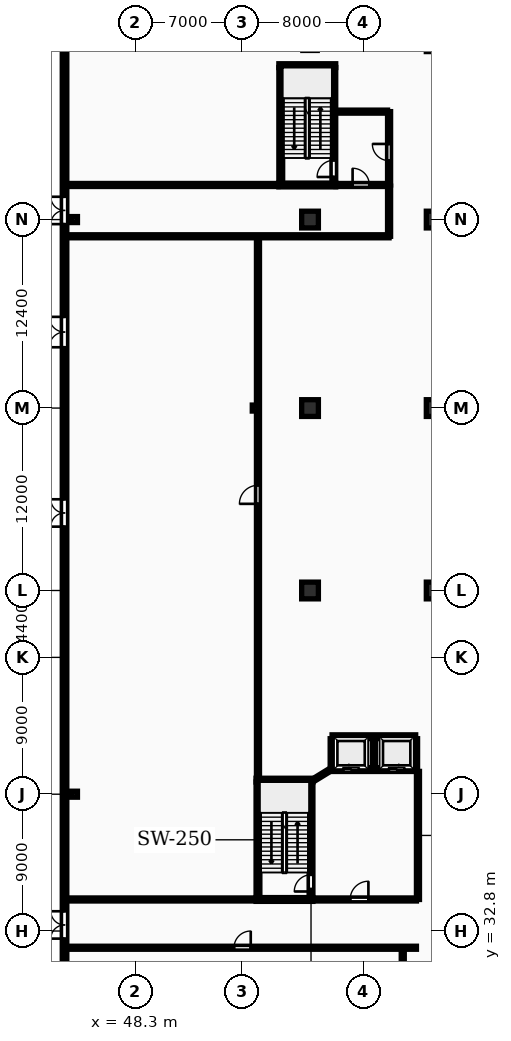
"""IFC4 building model, lengths in metres.
Left out: names, types, materials, properties, quantities, classifications, styles, units other than length and angle.
Written with IfcOpenShell. Run it as: python <this file> out.ifc"""

import sys

from ifc_helpers import new_model, si_unit, direction, frame, frame_2d, origin, origin_2d, place, context, subcontext, project, spatial, rectangle, i_section, extrude, element, fill, save


model = new_model("IFC4")
c1 = context("Model", 3, precision=1e-05, world=origin(), true_north=direction((0.0, 1.0)))
c2 = subcontext(c1, "Body", "Model", "MODEL_VIEW")
j1 = project(units=[si_unit("LENGTHUNIT", "METRE"), si_unit("PLANEANGLEUNIT", "RADIAN")], contexts=[c1])
p1 = place(None, origin())
s1 = spatial("IfcSite", under=j1, at=p1, CompositionType="ELEMENT")
p2 = place(p1, origin())
s2 = spatial("IfcBuilding", under=s1, at=p2, CompositionType="ELEMENT")
p3 = place(p2, origin())
s3 = spatial("IfcBuildingStorey", under=s2, at=p3, CompositionType="ELEMENT", Elevation=0.0)
for number, where, z_axis, x_axis in (
    (1, (59.8, 55.2, 0.0), (0.0, 0.0, 1.0), (1.0, 0.0, 0.0)),
    (2, (59.8, 67.2, 0.0), (0.0, 0.0, 1.0), (1.0, 0.0, 0.0)),
    (3, (59.8, 79.6, 0.0), (0.0, 0.0, 1.0), (1.0, 0.0, 0.0)),
    (4, (68.0, 55.2, 0.0), (0.0, 0.0, 1.0), (1.0, 0.0, 0.0)),
    (5, (68.0, 67.2, 0.0), (0.0, 0.0, 1.0), (1.0, 0.0, 0.0)),
    (6, (68.0, 79.6, 0.0), (0.0, 0.0, 1.0), (1.0, 0.0, 0.0)),
):
    element("IfcColumn", number, at=place(p3, frame(where, z_axis=z_axis, x_axis=x_axis)), inside=s3, PredefinedType="COLUMN", context=c2, shape_type="SweptSolid", body=[
        extrude(rectangle(XDim=1.1, YDim=1.1, at=origin_2d()), origin(), (0.0, 0.0, 1.0), 5.4),
    ])
for number, where, z_axis, x_axis in (
    (7, (56.2, 67.2, 0.0), (0.0, 0.0, 1.0), (1.0, 0.0, 0.0)),
    (8, (44.3, 41.8, 0.0), (0.0, 0.0, 1.0), (1.0, 0.0, 0.0)),
    (9, (44.3, 79.6, 0.0), (0.0, 0.0, 1.0), (1.0, 0.0, 0.0)),
):
    element("IfcColumn", number, at=place(p3, frame(where, z_axis=z_axis, x_axis=x_axis)), inside=s3, PredefinedType="COLUMN", context=c2, shape_type="SweptSolid", body=[
        extrude(i_section(OverallWidth=0.399, OverallDepth=0.394, WebThickness=0.023, FlangeThickness=0.037, FilletRadius=0.015, at=origin_2d()), origin(), (0.0, 0.0, 1.0), 5.4),
    ])
p4 = place(p3, frame((43.65, 109.2, 0.0), z_axis=(0.0, 0.0, 1.0), x_axis=(0.0, -1.0, 0.0)))
e10 = element("IfcWall", 10, at=p4, inside=s3, PredefinedType="STANDARD", context=c2, shape_type="SweptSolid", body=[
    extrude(rectangle(XDim=135.7, YDim=0.3, at=frame_2d((67.85, 0.0))), origin(), (0.0, 0.0, 1.0), 5.1),
])
p5 = place(p4, frame((75.1, 0.0, 0.0)))
e11 = element("IfcOpeningElement", 11, at=p5, cuts=e10, PredefinedType="OPENING", context=c2, shape_type="SweptSolid", body=[
    extrude(rectangle(XDim=1.8, YDim=2.2, at=frame_2d((0.9, 1.1))), frame((0.0, 0.16, 0.0), z_axis=(0.0, -1.0, 0.0), x_axis=(1.0, 0.0, 0.0)), (0.0, 0.0, 1.0), 0.32),
])
p6 = place(p4, frame((28.1, 0.0, 0.0)))
e12 = element("IfcOpeningElement", 12, at=p6, cuts=e10, PredefinedType="OPENING", context=c2, shape_type="SweptSolid", body=[
    extrude(rectangle(XDim=1.8, YDim=2.2, at=frame_2d((0.9, 1.1))), frame((0.0, 0.16, 0.0), z_axis=(0.0, -1.0, 0.0), x_axis=(1.0, 0.0, 0.0)), (0.0, 0.0, 1.0), 0.32),
])
p7 = place(p4, frame((36.0, 0.0, 0.0)))
e13 = element("IfcOpeningElement", 13, at=p7, cuts=e10, PredefinedType="OPENING", context=c2, shape_type="SweptSolid", body=[
    extrude(rectangle(XDim=2.0, YDim=2.6, at=frame_2d((1.0, 1.3))), frame((0.0, 0.16, 0.0), z_axis=(0.0, -1.0, 0.0), x_axis=(1.0, 0.0, 0.0)), (0.0, 0.0, 1.0), 0.32),
])
p8 = place(p4, frame((48.0, 0.0, 0.0)))
e14 = element("IfcOpeningElement", 14, at=p8, cuts=e10, PredefinedType="OPENING", context=c2, shape_type="SweptSolid", body=[
    extrude(rectangle(XDim=1.8, YDim=2.2, at=frame_2d((0.9, 1.1))), frame((0.0, 0.16, 0.0), z_axis=(0.0, -1.0, 0.0), x_axis=(1.0, 0.0, 0.0)), (0.0, 0.0, 1.0), 0.32),
])
p9 = place(p4, frame((122.8, 0.0, 0.0)))
e15 = element("IfcOpeningElement", 15, at=p9, cuts=e10, PredefinedType="OPENING", context=c2, shape_type="SweptSolid", body=[
    extrude(rectangle(XDim=1.8, YDim=2.2, at=frame_2d((0.9, 1.1))), frame((0.0, 0.16, 0.0), z_axis=(0.0, -1.0, 0.0), x_axis=(1.0, 0.0, 0.0)), (0.0, 0.0, 1.0), 0.32),
])
p10 = place(p3, frame((56.375, 35.0, 0.0), z_axis=(0.0, 0.0, 1.0), x_axis=(0.0, 1.0, 0.0)))
e16 = element("IfcWall", 16, at=p10, inside=s3, PredefinedType="SHEAR", context=c2, shape_type="SweptSolid", body=[
    extrude(rectangle(XDim=7.6, YDim=0.25, at=frame_2d((3.8, 0.0))), origin(), (0.0, 0.0, 1.0), 5.4),
])
for number, where, z_axis, x_axis in (
    (17, (56.25, 42.725, 0.0), (0.0, 0.0, 1.0), (1.0, 0.0, 0.0)),
    (18, (56.25, 34.875, 0.0), (0.0, 0.0, 1.0), (1.0, 0.0, 0.0)),
):
    element("IfcWall", number, at=place(p3, frame(where, z_axis=z_axis, x_axis=x_axis)), inside=s3, PredefinedType="SHEAR", context=c2, shape_type="SweptSolid", body=[
        extrude(rectangle(XDim=3.74, YDim=0.25, at=frame_2d((1.87, 0.0))), origin(), (0.0, 0.0, 1.0), 5.4),
    ])
p11 = place(p3, frame((59.865, 35.0, 0.0), z_axis=(0.0, 0.0, 1.0), x_axis=(0.0, 1.0, 0.0)))
e19 = element("IfcWall", 19, at=p11, inside=s3, PredefinedType="SHEAR", context=c2, shape_type="SweptSolid", body=[
    extrude(rectangle(XDim=7.6, YDim=0.25, at=frame_2d((3.8, 0.0))), origin(), (0.0, 0.0, 1.0), 5.4),
])
p12 = place(p11, frame((0.4, 0.0, 0.0)))
e20 = element("IfcOpeningElement", 20, at=p12, cuts=e19, PredefinedType="OPENING", context=c2, shape_type="SweptSolid", body=[
    extrude(rectangle(XDim=1.1, YDim=2.1, at=frame_2d((0.55, 1.05))), frame((0.0, 0.135, 0.0), z_axis=(0.0, -1.0, 0.0), x_axis=(1.0, 0.0, 0.0)), (0.0, 0.0, 1.0), 0.27),
])
p13 = place(p3, frame((61.25, 43.42, 0.0), z_axis=(0.0, 0.0, 1.0), x_axis=(1.0, 0.0, 0.0)))
e21 = element("IfcWall", 21, at=p13, inside=s3, PredefinedType="SHEAR", context=c2, shape_type="SweptSolid", body=[
    extrude(rectangle(XDim=5.5, YDim=0.25, at=frame_2d((2.75, 0.0))), origin(), (0.0, 0.0, 1.0), 5.4),
])
p14 = place(p13, frame((0.74, 0.0, 0.0)))
e22 = element("IfcOpeningElement", 22, at=p14, cuts=e21, PredefinedType="OPENING", context=c2, shape_type="SweptSolid", body=[
    extrude(rectangle(XDim=1.02, YDim=2.12, at=frame_2d((0.51, 1.06))), frame((0.0, 0.135, 0.0), z_axis=(0.0, -1.0, 0.0), x_axis=(1.0, 0.0, 0.0)), (0.0, 0.0, 1.0), 0.27),
])
p15 = place(p13, frame((3.74, 0.0, 0.0)))
e23 = element("IfcOpeningElement", 23, at=p15, cuts=e21, PredefinedType="OPENING", context=c2, shape_type="SweptSolid", body=[
    extrude(rectangle(XDim=1.02, YDim=2.12, at=frame_2d((0.51, 1.06))), frame((0.0, 0.135, 0.0), z_axis=(0.0, -1.0, 0.0), x_axis=(1.0, 0.0, 0.0)), (0.0, 0.0, 1.0), 0.27),
])
p16 = place(p3, frame((61.25, 45.58, 0.0), z_axis=(0.0, 0.0, 1.0), x_axis=(1.0, 0.0, 0.0)))
e24 = element("IfcWall", 24, at=p16, inside=s3, PredefinedType="SHEAR", context=c2, shape_type="SweptSolid", body=[
    extrude(rectangle(XDim=5.5, YDim=0.25, at=frame_2d((2.75, 0.0))), origin(), (0.0, 0.0, 1.0), 5.4),
])
for number, where, z_axis, x_axis in (
    (25, (61.25, 43.55, 0.0), (0.0, 0.0, 1.0), (0.0, 1.0, 0.0)),
    (26, (66.75, 43.55, 0.0), (0.0, 0.0, 1.0), (0.0, 1.0, 0.0)),
):
    element("IfcWall", number, at=place(p3, frame(where, z_axis=z_axis, x_axis=x_axis)), inside=s3, PredefinedType="SHEAR", context=c2, shape_type="SweptSolid", body=[
        extrude(rectangle(XDim=1.9, YDim=0.25, at=frame_2d((0.95, 0.0))), origin(), (0.0, 0.0, 1.0), 5.4),
    ])
p17 = place(p3, frame((64.0, 43.55, 0.0), z_axis=(0.0, 0.0, 1.0), x_axis=(0.0, 1.0, 0.0)))
e27 = element("IfcWall", 27, at=p17, inside=s3, PredefinedType="PARTITIONING", context=c2, shape_type="SweptSolid", body=[
    extrude(rectangle(XDim=1.9, YDim=0.2, at=frame_2d((0.95, 0.0))), origin(), (0.0, 0.0, 1.0), 5.1),
])
p18 = place(p3, frame((59.84, 34.875, 0.0), z_axis=(0.0, 0.0, 1.0), x_axis=(1.0, 0.0, 0.0)))
e28 = element("IfcWall", 28, at=p18, inside=s3, PredefinedType="PARTITIONING", context=c2, shape_type="SweptSolid", body=[
    extrude(rectangle(XDim=6.96, YDim=0.2, at=frame_2d((3.48, 0.0))), origin(), (0.0, 0.0, 1.0), 5.1),
])
p19 = place(p18, frame((2.6, 0.0, 0.0)))
e29 = element("IfcOpeningElement", 29, at=p19, cuts=e28, PredefinedType="OPENING", context=c2, shape_type="SweptSolid", body=[
    extrude(rectangle(XDim=1.2, YDim=2.18, at=frame_2d((0.6, 1.09))), frame((0.0, 0.11, 0.0), z_axis=(0.0, -1.0, 0.0), x_axis=(1.0, 0.0, 0.0)), (0.0, 0.0, 1.0), 0.22),
])
p20 = place(p3, frame((66.9, 34.875, 0.0), z_axis=(0.0, 0.0, 1.0), x_axis=(0.0, 1.0, 0.0)))
e30 = element("IfcWall", 30, at=p20, inside=s3, PredefinedType="PARTITIONING", context=c2, shape_type="SweptSolid", body=[
    extrude(rectangle(XDim=8.425, YDim=0.2, at=frame_2d((4.212, 0.0))), origin(), (0.0, 0.0, 1.0), 5.1),
])
p21 = place(p3, frame((60.02, 42.725, 0.0), z_axis=(0.0, 0.0, 1.0), x_axis=(0.851822584555, 0.523830396638, 0.0)))
e31 = element("IfcWall", 31, at=p21, inside=s3, PredefinedType="PARTITIONING", context=c2, shape_type="SweptSolid", body=[
    extrude(rectangle(XDim=1.326, YDim=0.2, at=frame_2d((0.663, 0.0))), origin(), (0.0, 0.0, 1.0), 5.1),
])
p22 = place(p3, frame((57.875, 82.0, 0.0), z_axis=(0.0, 0.0, 1.0), x_axis=(0.0, 1.0, 0.0)))
e32 = element("IfcWall", 32, at=p22, inside=s3, PredefinedType="SHEAR", context=c2, shape_type="SweptSolid", body=[
    extrude(rectangle(XDim=7.6, YDim=0.25, at=frame_2d((3.8, 0.0))), origin(), (0.0, 0.0, 1.0), 5.4),
])
for number, where, z_axis, x_axis in (
    (33, (57.75, 81.875, 0.0), (0.0, 0.0, 1.0), (1.0, 0.0, 0.0)),
    (34, (57.75, 89.725, 0.0), (0.0, 0.0, 1.0), (1.0, 0.0, 0.0)),
):
    element("IfcWall", number, at=place(p3, frame(where, z_axis=z_axis, x_axis=x_axis)), inside=s3, PredefinedType="SHEAR", context=c2, shape_type="SweptSolid", body=[
        extrude(rectangle(XDim=3.74, YDim=0.25, at=frame_2d((1.87, 0.0))), origin(), (0.0, 0.0, 1.0), 5.4),
    ])
p23 = place(p3, frame((61.365, 82.0, 0.0), z_axis=(0.0, 0.0, 1.0), x_axis=(0.0, 1.0, 0.0)))
e35 = element("IfcWall", 35, at=p23, inside=s3, PredefinedType="SHEAR", context=c2, shape_type="SweptSolid", body=[
    extrude(rectangle(XDim=7.6, YDim=0.25, at=frame_2d((3.8, 0.0))), origin(), (0.0, 0.0, 1.0), 5.4),
])
p24 = place(p23, frame((0.4, 0.0, 0.0)))
e36 = element("IfcOpeningElement", 36, at=p24, cuts=e35, PredefinedType="OPENING", context=c2, shape_type="SweptSolid", body=[
    extrude(rectangle(XDim=1.1, YDim=2.1, at=frame_2d((0.55, 1.05))), frame((0.0, 0.135, 0.0), z_axis=(0.0, -1.0, 0.0), x_axis=(1.0, 0.0, 0.0)), (0.0, 0.0, 1.0), 0.27),
])
p25 = place(p3, frame((65.0, 81.875, 0.0), z_axis=(0.0, 0.0, 1.0), x_axis=(0.0, 1.0, 0.0)))
e37 = element("IfcWall", 37, at=p25, inside=s3, PredefinedType="PARTITIONING", context=c2, shape_type="SweptSolid", body=[
    extrude(rectangle(XDim=4.825, YDim=0.2, at=frame_2d((2.413, 0.0))), origin(), (0.0, 0.0, 1.0), 5.1),
])
p26 = place(p25, frame((1.6, 0.0, 0.0)))
e38 = element("IfcOpeningElement", 38, at=p26, cuts=e37, PredefinedType="OPENING", context=c2, shape_type="SweptSolid", body=[
    extrude(rectangle(XDim=1.1, YDim=2.15, at=frame_2d((0.55, 1.075))), frame((0.0, 0.11, 0.0), z_axis=(0.0, -1.0, 0.0), x_axis=(1.0, 0.0, 0.0)), (0.0, 0.0, 1.0), 0.22),
])
p27 = place(p3, frame((61.5, 81.875, 0.0), z_axis=(0.0, 0.0, 1.0), x_axis=(1.0, 0.0, 0.0)))
e39 = element("IfcWall", 39, at=p27, inside=s3, PredefinedType="PARTITIONING", context=c2, shape_type="SweptSolid", body=[
    extrude(rectangle(XDim=3.4, YDim=0.2, at=frame_2d((1.7, 0.0))), origin(), (0.0, 0.0, 1.0), 5.1),
])
p28 = place(p27, frame((1.1, 0.0, 0.0)))
e40 = element("IfcOpeningElement", 40, at=p28, cuts=e39, PredefinedType="OPENING", context=c2, shape_type="SweptSolid", body=[
    extrude(rectangle(XDim=1.1, YDim=2.1, at=frame_2d((0.55, 1.05))), frame((0.0, 0.11, 0.0), z_axis=(0.0, -1.0, 0.0), x_axis=(1.0, 0.0, 0.0)), (0.0, 0.0, 1.0), 0.22),
])
p29 = place(p3, frame((61.5, 86.7, 0.0), z_axis=(0.0, 0.0, 1.0), x_axis=(1.0, 0.0, 0.0)))
e41 = element("IfcWall", 41, at=p29, inside=s3, PredefinedType="PARTITIONING", context=c2, shape_type="SweptSolid", body=[
    extrude(rectangle(XDim=3.4, YDim=0.2, at=frame_2d((1.7, 0.0))), origin(), (0.0, 0.0, 1.0), 5.1),
])
p30 = place(p3, frame((43.8, 31.7, 0.0), z_axis=(0.0, 0.0, 1.0), x_axis=(1.0, 0.0, 0.0)))
e42 = element("IfcWall", 42, at=p30, inside=s3, PredefinedType="PARTITIONING", context=c2, shape_type="SweptSolid", body=[
    extrude(rectangle(XDim=23.0, YDim=0.2, at=frame_2d((11.5, 0.0))), origin(), (0.0, 0.0, 1.0), 5.1),
])
p31 = place(p30, frame((11.0, 0.0, 0.0)))
e43 = element("IfcOpeningElement", 43, at=p31, cuts=e42, PredefinedType="OPENING", context=c2, shape_type="SweptSolid", body=[
    extrude(rectangle(XDim=1.1, YDim=2.1, at=frame_2d((0.55, 1.05))), frame((0.0, 0.11, 0.0), z_axis=(0.0, -1.0, 0.0), x_axis=(1.0, 0.0, 0.0)), (0.0, 0.0, 1.0), 0.22),
])
p32 = place(p3, frame((43.8, 34.875, 0.0), z_axis=(0.0, 0.0, 1.0), x_axis=(1.0, 0.0, 0.0)))
e44 = element("IfcWall", 44, at=p32, inside=s3, PredefinedType="PARTITIONING", context=c2, shape_type="SweptSolid", body=[
    extrude(rectangle(XDim=12.4, YDim=0.2, at=frame_2d((6.2, 0.0))), origin(), (0.0, 0.0, 1.0), 5.1),
])
p33 = place(p3, frame((43.8, 78.5, 0.0), z_axis=(0.0, 0.0, 1.0), x_axis=(1.0, 0.0, 0.0)))
e45 = element("IfcWall", 45, at=p33, inside=s3, PredefinedType="PARTITIONING", context=c2, shape_type="SweptSolid", body=[
    extrude(rectangle(XDim=21.2, YDim=0.2, at=frame_2d((10.6, 0.0))), origin(), (0.0, 0.0, 1.0), 5.1),
])
p34 = place(p3, frame((43.8, 81.875, 0.0), z_axis=(0.0, 0.0, 1.0), x_axis=(1.0, 0.0, 0.0)))
e46 = element("IfcWall", 46, at=p34, inside=s3, PredefinedType="PARTITIONING", context=c2, shape_type="SweptSolid", body=[
    extrude(rectangle(XDim=13.9, YDim=0.2, at=frame_2d((6.95, 0.0))), origin(), (0.0, 0.0, 1.0), 5.1),
])
p35 = place(p3, frame((65.0, 78.5, 0.0), z_axis=(0.0, 0.0, 1.0), x_axis=(0.0, 1.0, 0.0)))
e47 = element("IfcWall", 47, at=p35, inside=s3, PredefinedType="PARTITIONING", context=c2, shape_type="SweptSolid", body=[
    extrude(rectangle(XDim=3.3, YDim=0.2, at=frame_2d((1.65, 0.0))), origin(), (0.0, 0.0, 1.0), 5.1),
])
p36 = place(p3, frame((65.9, -21.6, 0.0), z_axis=(0.0, 0.0, 1.0), x_axis=(0.0, 1.0, 0.0)))
e48 = element("IfcWall", 48, at=p36, inside=s3, PredefinedType="PARTITIONING", context=c2, shape_type="SweptSolid", body=[
    extrude(rectangle(XDim=53.15, YDim=0.2, at=frame_2d((26.575, 0.0))), origin(), (0.0, 0.0, 1.0), 5.1),
])
p37 = place(p36, frame((22.0, 0.0, 0.0)))
e49 = element("IfcOpeningElement", 49, at=p37, cuts=e48, PredefinedType="OPENING", context=c2, shape_type="SweptSolid", body=[
    extrude(rectangle(XDim=1.22, YDim=2.18, at=frame_2d((0.61, 1.09))), frame((0.0, 0.11, 0.0), z_axis=(0.0, -1.0, 0.0), x_axis=(1.0, 0.0, 0.0)), (0.0, 0.0, 1.0), 0.22),
])
p38 = place(p3, frame((56.375, 42.9, 0.0), z_axis=(0.0, 0.0, 1.0), x_axis=(0.0, 1.0, 0.0)))
e50 = element("IfcWall", 50, at=p38, inside=s3, PredefinedType="PARTITIONING", context=c2, shape_type="SweptSolid", body=[
    extrude(rectangle(XDim=35.55, YDim=0.2, at=frame_2d((17.775, 0.0))), origin(), (0.0, 0.0, 1.0), 4.33),
])
p39 = place(p38, frame((18.0, 0.0, 0.0)))
e51 = element("IfcOpeningElement", 51, at=p39, cuts=e50, PredefinedType="OPENING", context=c2, shape_type="SweptSolid", body=[
    extrude(rectangle(XDim=1.22, YDim=2.18, at=frame_2d((0.61, 1.09))), frame((0.0, 0.11, 0.0), z_axis=(0.0, -1.0, 0.0), x_axis=(1.0, 0.0, 0.0)), (0.0, 0.0, 1.0), 0.22),
])
p40 = place(p5, frame((1.8, 0.0, 0.0), z_axis=(0.0, 0.0, 1.0), x_axis=(-1.0, 0.0, 0.0)))
e52 = element("IfcDoor", 52, at=p40, inside=s3, OperationType="DOUBLE_DOOR_SINGLE_SWING", PredefinedType="DOOR", context=c2, shape_type="SweptSolid", body=[
    extrude(rectangle(XDim=1.8, YDim=2.2, at=frame_2d((0.9, 1.1))), frame((0.0, 0.025, 0.0), z_axis=(0.0, -1.0, 0.0), x_axis=(1.0, 0.0, 0.0)), (0.0, 0.0, 1.0), 0.05),
])
fill(e11, e52)
p41 = place(p6, frame((1.8, 0.0, 0.0), z_axis=(0.0, 0.0, 1.0), x_axis=(-1.0, 0.0, 0.0)))
e53 = element("IfcDoor", 53, at=p41, inside=s3, OperationType="DOUBLE_DOOR_SINGLE_SWING", PredefinedType="DOOR", context=c2, shape_type="SweptSolid", body=[
    extrude(rectangle(XDim=1.8, YDim=2.2, at=frame_2d((0.9, 1.1))), frame((0.0, 0.025, 0.0), z_axis=(0.0, -1.0, 0.0), x_axis=(1.0, 0.0, 0.0)), (0.0, 0.0, 1.0), 0.05),
])
fill(e12, e53)
p42 = place(p7, frame((2.0, 0.0, 0.0), z_axis=(0.0, 0.0, 1.0), x_axis=(-1.0, 0.0, 0.0)))
e54 = element("IfcDoor", 54, at=p42, inside=s3, OperationType="DOUBLE_DOOR_SINGLE_SWING", PredefinedType="DOOR", context=c2, shape_type="SweptSolid", body=[
    extrude(rectangle(XDim=2.0, YDim=2.6, at=frame_2d((1.0, 1.3))), frame((0.0, 0.025, 0.0), z_axis=(0.0, -1.0, 0.0), x_axis=(1.0, 0.0, 0.0)), (0.0, 0.0, 1.0), 0.05),
])
fill(e13, e54)
p43 = place(p8, frame((1.8, 0.0, 0.0), z_axis=(0.0, 0.0, 1.0), x_axis=(-1.0, 0.0, 0.0)))
e55 = element("IfcDoor", 55, at=p43, inside=s3, OperationType="DOUBLE_DOOR_SINGLE_SWING", PredefinedType="DOOR", context=c2, shape_type="SweptSolid", body=[
    extrude(rectangle(XDim=1.8, YDim=2.2, at=frame_2d((0.9, 1.1))), frame((0.0, 0.025, 0.0), z_axis=(0.0, -1.0, 0.0), x_axis=(1.0, 0.0, 0.0)), (0.0, 0.0, 1.0), 0.05),
])
fill(e14, e55)
p44 = place(p12, origin())
e56 = element("IfcDoor", 56, at=p44, inside=s3, OperationType="SINGLE_SWING_LEFT", PredefinedType="DOOR", context=c2, shape_type="SweptSolid", body=[
    extrude(rectangle(XDim=1.1, YDim=2.1, at=frame_2d((0.55, 1.05))), frame((0.0, 0.025, 0.0), z_axis=(0.0, -1.0, 0.0), x_axis=(1.0, 0.0, 0.0)), (0.0, 0.0, 1.0), 0.05),
])
fill(e20, e56)
p45 = place(p14, origin())
e57 = element("IfcDoor", 57, at=p45, inside=s3, OperationType="SLIDING_TO_LEFT", PredefinedType="DOOR", context=c2, shape_type="SweptSolid", body=[
    extrude(rectangle(XDim=1.02, YDim=2.12, at=frame_2d((0.51, 1.06))), frame((0.0, 0.025, 0.0), z_axis=(0.0, -1.0, 0.0), x_axis=(1.0, 0.0, 0.0)), (0.0, 0.0, 1.0), 0.05),
])
fill(e22, e57)
p46 = place(p15, origin())
e58 = element("IfcDoor", 58, at=p46, inside=s3, OperationType="SLIDING_TO_RIGHT", PredefinedType="DOOR", context=c2, shape_type="SweptSolid", body=[
    extrude(rectangle(XDim=1.02, YDim=2.12, at=frame_2d((0.51, 1.06))), frame((0.0, 0.025, 0.0), z_axis=(0.0, -1.0, 0.0), x_axis=(1.0, 0.0, 0.0)), (0.0, 0.0, 1.0), 0.05),
])
fill(e23, e58)
p47 = place(p19, origin())
e59 = element("IfcDoor", 59, at=p47, inside=s3, OperationType="SINGLE_SWING_RIGHT", PredefinedType="DOOR", context=c2, shape_type="SweptSolid", body=[
    extrude(rectangle(XDim=1.2, YDim=2.18, at=frame_2d((0.6, 1.09))), frame((0.0, 0.025, 0.0), z_axis=(0.0, -1.0, 0.0), x_axis=(1.0, 0.0, 0.0)), (0.0, 0.0, 1.0), 0.05),
])
fill(e29, e59)
p48 = place(p24, origin())
e60 = element("IfcDoor", 60, at=p48, inside=s3, OperationType="SINGLE_SWING_LEFT", PredefinedType="DOOR", context=c2, shape_type="SweptSolid", body=[
    extrude(rectangle(XDim=1.1, YDim=2.1, at=frame_2d((0.55, 1.05))), frame((0.0, 0.025, 0.0), z_axis=(0.0, -1.0, 0.0), x_axis=(1.0, 0.0, 0.0)), (0.0, 0.0, 1.0), 0.05),
])
fill(e36, e60)
p49 = place(p26, origin())
e61 = element("IfcDoor", 61, at=p49, inside=s3, OperationType="SINGLE_SWING_RIGHT", PredefinedType="DOOR", context=c2, shape_type="SweptSolid", body=[
    extrude(rectangle(XDim=1.1, YDim=2.15, at=frame_2d((0.55, 1.075))), frame((0.0, 0.025, 0.0), z_axis=(0.0, -1.0, 0.0), x_axis=(1.0, 0.0, 0.0)), (0.0, 0.0, 1.0), 0.05),
])
fill(e38, e61)
p50 = place(p28, origin())
e62 = element("IfcDoor", 62, at=p50, inside=s3, OperationType="SINGLE_SWING_LEFT", PredefinedType="DOOR", context=c2, shape_type="SweptSolid", body=[
    extrude(rectangle(XDim=1.1, YDim=2.1, at=frame_2d((0.55, 1.05))), frame((0.0, 0.025, 0.0), z_axis=(0.0, -1.0, 0.0), x_axis=(1.0, 0.0, 0.0)), (0.0, 0.0, 1.0), 0.05),
])
fill(e40, e62)
p51 = place(p31, origin())
e63 = element("IfcDoor", 63, at=p51, inside=s3, OperationType="SINGLE_SWING_RIGHT", PredefinedType="DOOR", context=c2, shape_type="SweptSolid", body=[
    extrude(rectangle(XDim=1.1, YDim=2.1, at=frame_2d((0.55, 1.05))), frame((0.0, 0.025, 0.0), z_axis=(0.0, -1.0, 0.0), x_axis=(1.0, 0.0, 0.0)), (0.0, 0.0, 1.0), 0.05),
])
fill(e43, e63)
p52 = place(p39, origin())
e64 = element("IfcDoor", 64, at=p52, inside=s3, OperationType="SINGLE_SWING_LEFT", PredefinedType="DOOR", context=c2, shape_type="SweptSolid", body=[
    extrude(rectangle(XDim=1.22, YDim=2.18, at=frame_2d((0.61, 1.09))), frame((0.0, 0.025, 0.0), z_axis=(0.0, -1.0, 0.0), x_axis=(1.0, 0.0, 0.0)), (0.0, 0.0, 1.0), 0.05),
])
fill(e51, e64)
save(model, sys.argv[1])
